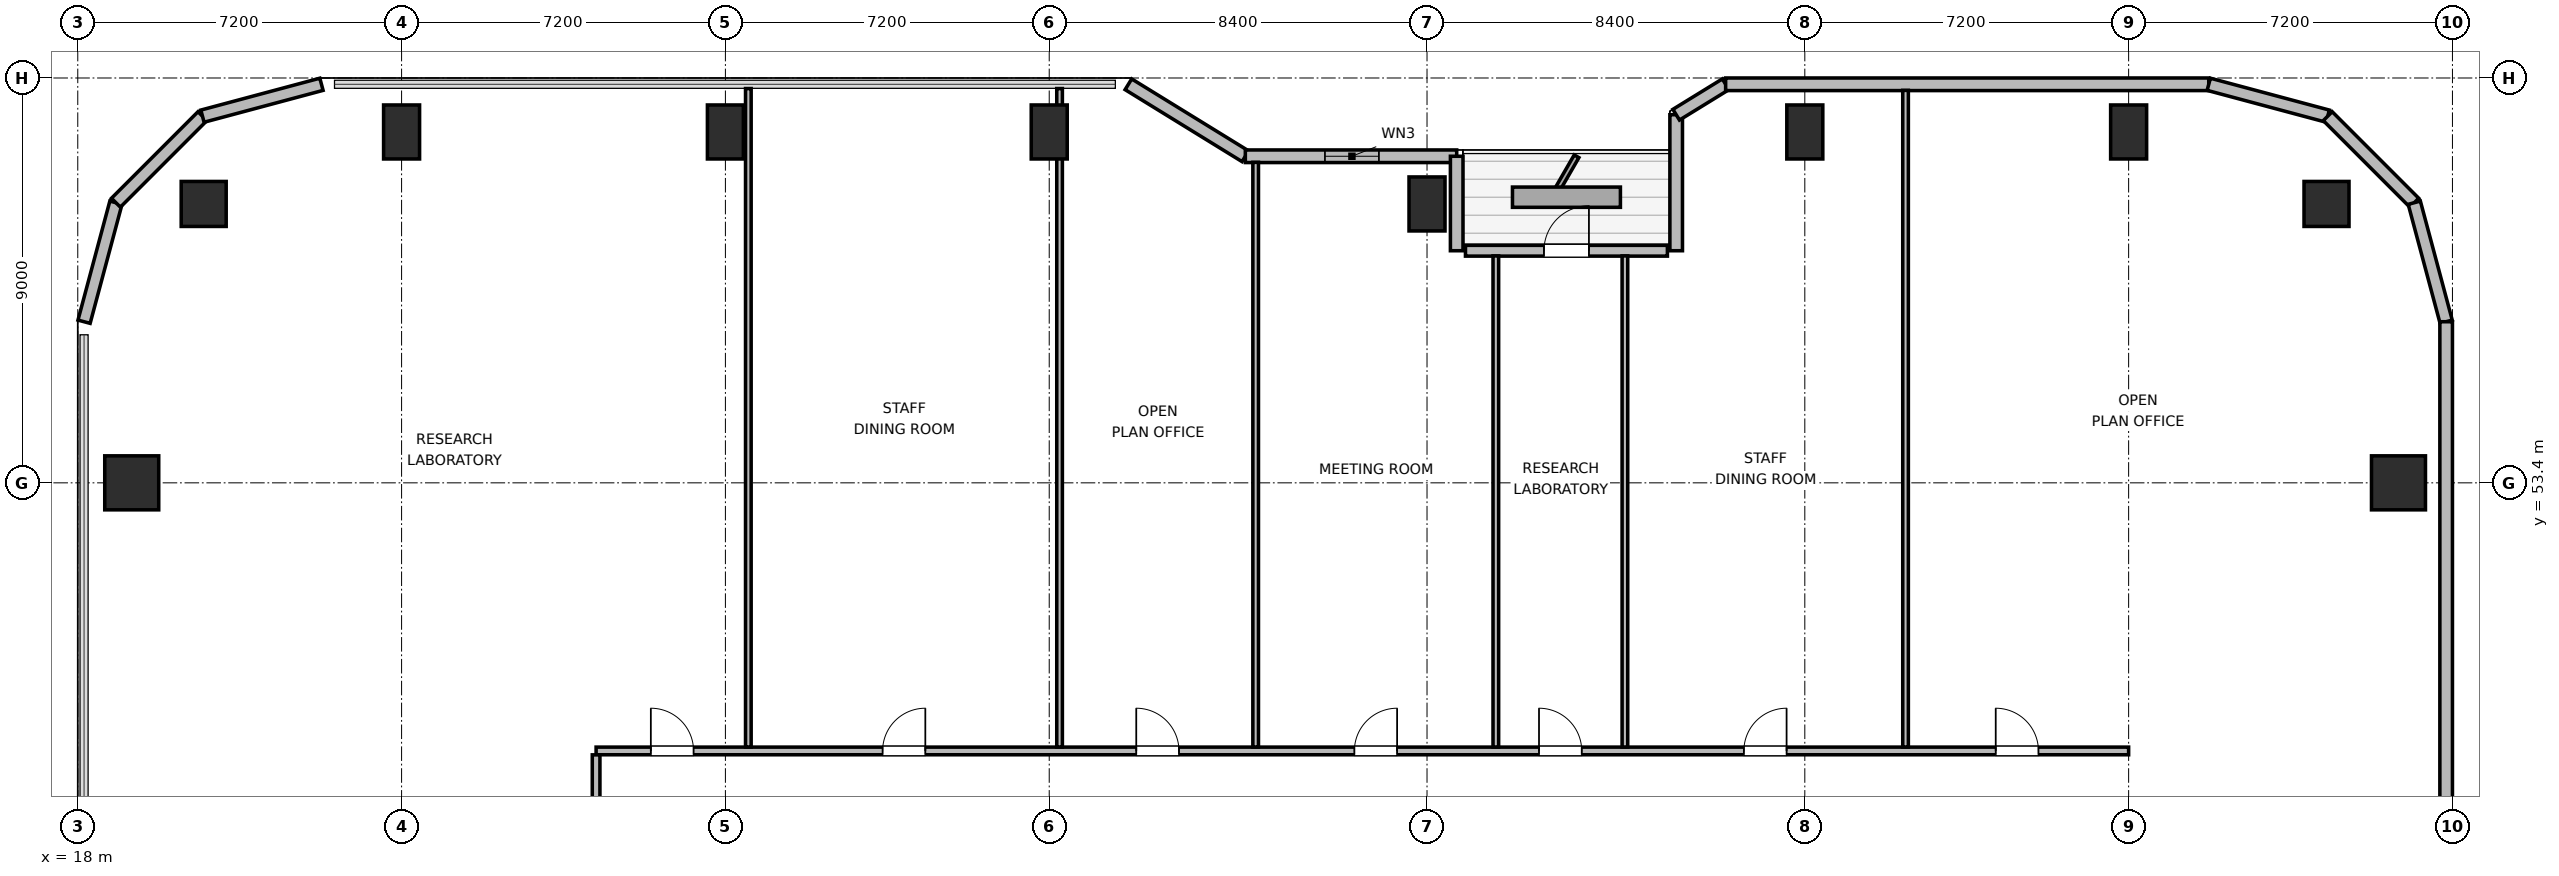
"""IFC4 building model, lengths in metres.
Left out: names, types, materials, properties, quantities, classifications, styles, units other than length and angle.
Written with IfcOpenShell. Run it as: python <this file> out.ifc"""

import sys

from ifc_helpers import new_model, si_unit, direction, frame, frame_2d, origin, origin_2d, place, context, subcontext, project, spatial, rectangle, circle, extrude, element, fill, save


model = new_model("IFC4")
c1 = context("Model", 3, precision=1e-05, world=origin(), true_north=direction((0.0, 1.0)))
c2 = subcontext(c1, "Body", "Model", "MODEL_VIEW")
j1 = project(units=[si_unit("LENGTHUNIT", "METRE"), si_unit("PLANEANGLEUNIT", "RADIAN")], contexts=[c1])
p1 = place(None, origin())
s1 = spatial("IfcSite", under=j1, at=p1, CompositionType="ELEMENT")
p2 = place(p1, origin())
s2 = spatial("IfcBuilding", under=s1, at=p2, CompositionType="ELEMENT")
p3 = place(p2, frame((0.0, 0.0, 174.0)))
s3 = spatial("IfcBuildingStorey", under=s2, at=p3, CompositionType="ELEMENT", Elevation=174.0)
for number, where, z_axis, x_axis in (
    (1, (68.0, 59.6, 0.0), (0.0, 0.0, 1.0), (1.0, 0.0, 0.0)),
    (2, (20.8, 59.6, 0.0), (0.0, 0.0, 1.0), (1.0, 0.0, 0.0)),
):
    element("IfcColumn", number, at=place(p3, frame(where, z_axis=z_axis, x_axis=x_axis)), inside=s3, PredefinedType="COLUMN", context=c2, shape_type="SweptSolid", body=[
        extrude(circle(Radius=0.5, at=origin_2d()), origin(), (0.0, 0.0, 1.0), 3.9),
    ])
for number, where, z_axis, x_axis in (
    (3, (25.2, 61.2, 0.0), (0.0, 0.0, 1.0), (1.0, 0.0, 0.0)),
    (4, (32.4, 61.2, 0.0), (0.0, 0.0, 1.0), (1.0, 0.0, 0.0)),
    (5, (39.6, 61.2, 0.0), (0.0, 0.0, 1.0), (1.0, 0.0, 0.0)),
    (6, (48.0, 59.6, 0.0), (0.0, 0.0, 1.0), (1.0, 0.0, 0.0)),
    (7, (56.4, 61.2, 0.0), (0.0, 0.0, 1.0), (1.0, 0.0, 0.0)),
    (8, (63.6, 61.2, 0.0), (0.0, 0.0, 1.0), (1.0, 0.0, 0.0)),
):
    element("IfcColumn", number, at=place(p3, frame(where, z_axis=z_axis, x_axis=x_axis)), inside=s3, PredefinedType="COLUMN", context=c2, shape_type="SweptSolid", body=[
        extrude(rectangle(XDim=0.8, YDim=1.2, at=origin_2d()), origin(), (0.0, 0.0, 1.0), 3.9),
    ])
for number, where, z_axis, x_axis in (
    (9, (19.2, 53.4, 0.0), (0.0, 0.0, 1.0), (1.0, 0.0, 0.0)),
    (10, (69.6, 53.4, 0.0), (0.0, 0.0, 1.0), (1.0, 0.0, 0.0)),
):
    element("IfcColumn", number, at=place(p3, frame(where, z_axis=z_axis, x_axis=x_axis)), inside=s3, PredefinedType="COLUMN", context=c2, shape_type="SweptSolid", body=[
        extrude(rectangle(XDim=1.2, YDim=1.2, at=origin_2d()), origin(), (0.0, 0.0, 1.0), 3.9),
    ])
p4 = place(p3, frame((18.14, 56.982, 0.0), z_axis=(0.0, 0.0, 1.0), x_axis=(0.258672222976, 0.9659651552, 0.0)))
e11 = element("IfcWall", 11, at=p4, inside=s3, PredefinedType="SOLIDWALL", context=c2, shape_type="SweptSolid", body=[
    extrude(rectangle(XDim=2.739, YDim=0.28, at=frame_2d((1.37, 0.0))), origin(), (0.0, 0.0, 1.0), 3.68),
])
p5 = place(p3, frame((18.848, 59.627, 0.0), z_axis=(0.0, 0.0, 1.0), x_axis=(0.707106781187, 0.707106781187, 0.0)))
e12 = element("IfcWall", 12, at=p5, inside=s3, PredefinedType="SOLIDWALL", context=c2, shape_type="SweptSolid", body=[
    extrude(rectangle(XDim=2.721, YDim=0.28, at=frame_2d((1.36, 0.0))), origin(), (0.0, 0.0, 1.0), 3.68),
])
p6 = place(p3, frame((20.772, 61.552, 0.0), z_axis=(0.0, 0.0, 1.0), x_axis=(0.965971118627, 0.258649952598, 0.0)))
e13 = element("IfcWall", 13, at=p6, inside=s3, PredefinedType="SOLIDWALL", context=c2, shape_type="SweptSolid", body=[
    extrude(rectangle(XDim=2.739, YDim=0.28, at=frame_2d((1.37, 0.0))), origin(), (0.0, 0.0, 1.0), 3.68),
])
p7 = place(p3, frame((41.36, 62.26, 0.0), z_axis=(0.0, 0.0, 1.0), x_axis=(0.851652825334, -0.524106349037, 0.0)))
e14 = element("IfcWall", 14, at=p7, inside=s3, PredefinedType="SOLIDWALL", context=c2, shape_type="SweptSolid", body=[
    extrude(rectangle(XDim=3.053, YDim=0.28, at=frame_2d((1.526, 0.0))), origin(), (0.0, 0.0, 1.0), 2.265),
])
p8 = place(p3, frame((43.96, 60.66, 0.0), z_axis=(0.0, 0.0, 1.0), x_axis=(1.0, 0.0, 0.0)))
e15 = element("IfcWall", 15, at=p8, inside=s3, PredefinedType="SOLIDWALL", context=c2, shape_type="SweptSolid", body=[
    extrude(rectangle(XDim=4.699, YDim=0.28, at=frame_2d((2.35, 0.0))), origin(), (0.0, 0.0, 1.0), 2.265),
])
p9 = place(p8, frame((1.77, 0.0, 0.85)))
e16 = element("IfcOpeningElement", 16, at=p9, cuts=e15, PredefinedType="OPENING", context=c2, shape_type="SweptSolid", body=[
    extrude(rectangle(XDim=1.2, YDim=1.1, at=frame_2d((0.6, 0.55))), frame((0.0, 0.15, 0.0), z_axis=(0.0, -1.0, 0.0), x_axis=(1.0, 0.0, 0.0)), (0.0, 0.0, 1.0), 0.3),
])
p10 = place(p3, frame((48.66, 60.66, 0.0), z_axis=(0.0, 0.0, 1.0), x_axis=(0.0, -1.0, 0.0)))
e17 = element("IfcWall", 17, at=p10, inside=s3, PredefinedType="SOLIDWALL", context=c2, shape_type="SweptSolid", body=[
    extrude(rectangle(XDim=2.1, YDim=0.28, at=frame_2d((1.05, 0.0))), origin(), (0.0, 0.0, 1.0), 2.265),
])
p11 = place(p3, frame((48.855, 58.56, 0.0), z_axis=(0.0, 0.0, 1.0), x_axis=(1.0, 0.0, 0.0)))
e18 = element("IfcWall", 18, at=p11, inside=s3, PredefinedType="SOLIDWALL", context=c2, shape_type="SweptSolid", body=[
    extrude(rectangle(XDim=4.49, YDim=0.24, at=frame_2d((2.245, 0.0))), origin(), (0.0, 0.0, 1.0), 3.68),
])
p12 = place(p11, frame((1.745, 0.0, 0.0)))
e19 = element("IfcOpeningElement", 19, at=p12, cuts=e18, PredefinedType="OPENING", context=c2, shape_type="SweptSolid", body=[
    extrude(rectangle(XDim=1.0, YDim=2.02, at=frame_2d((0.5, 1.01))), frame((0.0, 0.13, 0.0), z_axis=(0.0, -1.0, 0.0), x_axis=(1.0, 0.0, 0.0)), (0.0, 0.0, 1.0), 0.26),
])
p13 = place(p3, frame((53.54, 58.56, 0.0), z_axis=(0.0, 0.0, 1.0), x_axis=(0.0, 1.0, 0.0)))
e20 = element("IfcWall", 20, at=p13, inside=s3, PredefinedType="SOLIDWALL", context=c2, shape_type="SweptSolid", body=[
    extrude(rectangle(XDim=3.024, YDim=0.28, at=frame_2d((1.512, 0.0))), origin(), (0.0, 0.0, 1.0), 2.265),
])
p14 = place(p3, frame((53.54, 61.584, 0.0), z_axis=(0.0, 0.0, 1.0), x_axis=(0.851801140441, 0.523865266212, 0.0)))
e21 = element("IfcWall", 21, at=p14, inside=s3, PredefinedType="SOLIDWALL", context=c2, shape_type="SweptSolid", body=[
    extrude(rectangle(XDim=1.291, YDim=0.28, at=frame_2d((0.646, 0.0))), origin(), (0.0, 0.0, 1.0), 3.68),
])
p15 = place(p3, frame((54.64, 62.26, 0.0), z_axis=(0.0, 0.0, 1.0), x_axis=(1.0, 0.0, 0.0)))
e22 = element("IfcWall", 22, at=p15, inside=s3, PredefinedType="SOLIDWALL", context=c2, shape_type="SweptSolid", body=[
    extrude(rectangle(XDim=10.742, YDim=0.28, at=frame_2d((5.371, 0.0))), origin(), (0.0, 0.0, 1.0), 3.68),
])
p16 = place(p3, frame((65.382, 62.26, 0.0), z_axis=(0.0, 0.0, 1.0), x_axis=(0.965971118627, -0.258649952598, 0.0)))
e23 = element("IfcWall", 23, at=p16, inside=s3, PredefinedType="SOLIDWALL", context=c2, shape_type="SweptSolid", body=[
    extrude(rectangle(XDim=2.739, YDim=0.28, at=frame_2d((1.37, 0.0))), origin(), (0.0, 0.0, 1.0), 3.68),
])
p17 = place(p3, frame((68.028, 61.552, 0.0), z_axis=(0.0, 0.0, 1.0), x_axis=(0.707061915429, -0.707151644098, 0.0)))
e24 = element("IfcWall", 24, at=p17, inside=s3, PredefinedType="SOLIDWALL", context=c2, shape_type="SweptSolid", body=[
    extrude(rectangle(XDim=2.721, YDim=0.28, at=frame_2d((1.36, 0.0))), origin(), (0.0, 0.0, 1.0), 3.68),
])
p18 = place(p3, frame((69.951, 59.627, 0.0), z_axis=(0.0, 0.0, 1.0), x_axis=(0.258672222976, -0.9659651552, 0.0)))
e25 = element("IfcWall", 25, at=p18, inside=s3, PredefinedType="SOLIDWALL", context=c2, shape_type="SweptSolid", body=[
    extrude(rectangle(XDim=2.739, YDim=0.28, at=frame_2d((1.37, 0.0))), origin(), (0.0, 0.0, 1.0), 3.68),
])
p19 = place(p3, frame((70.66, 56.982, 0.0), z_axis=(0.0, 0.0, 1.0), x_axis=(0.0, -1.0, 0.0)))
e26 = element("IfcWall", 26, at=p19, inside=s3, PredefinedType="SOLIDWALL", context=c2, shape_type="SweptSolid", body=[
    extrude(rectangle(XDim=14.242, YDim=0.28, at=frame_2d((7.121, 0.0))), origin(), (0.0, 0.0, 1.0), 3.68),
])
p20 = place(p3, frame((29.525, 47.44, 0.0), z_axis=(0.0, 0.0, 1.0), x_axis=(1.0, 0.0, 0.0)))
e27 = element("IfcWall", 27, at=p20, inside=s3, PredefinedType="PARTITIONING", context=c2, shape_type="SweptSolid", body=[
    extrude(rectangle(XDim=34.075, YDim=0.17, at=frame_2d((17.038, 0.0))), origin(), (0.0, 0.0, 1.0), 3.68),
])
p21 = place(p20, frame((1.217, 0.0, 0.0)))
e28 = element("IfcOpeningElement", 28, at=p21, cuts=e27, PredefinedType="OPENING", context=c2, shape_type="SweptSolid", body=[
    extrude(rectangle(XDim=0.95, YDim=2.04, at=frame_2d((0.475, 1.02))), frame((0.0, 0.095, 0.0), z_axis=(0.0, -1.0, 0.0), x_axis=(1.0, 0.0, 0.0)), (0.0, 0.0, 1.0), 0.19),
])
p22 = place(p20, frame((6.37, 0.0, 0.0)))
e29 = element("IfcOpeningElement", 29, at=p22, cuts=e27, PredefinedType="OPENING", context=c2, shape_type="SweptSolid", body=[
    extrude(rectangle(XDim=0.95, YDim=2.04, at=frame_2d((0.475, 1.02))), frame((0.0, 0.095, 0.0), z_axis=(0.0, -1.0, 0.0), x_axis=(1.0, 0.0, 0.0)), (0.0, 0.0, 1.0), 0.19),
])
p23 = place(p20, frame((12.01, 0.0, 0.0)))
e30 = element("IfcOpeningElement", 30, at=p23, cuts=e27, PredefinedType="OPENING", context=c2, shape_type="SweptSolid", body=[
    extrude(rectangle(XDim=0.95, YDim=2.04, at=frame_2d((0.475, 1.02))), frame((0.0, 0.095, 0.0), z_axis=(0.0, -1.0, 0.0), x_axis=(1.0, 0.0, 0.0)), (0.0, 0.0, 1.0), 0.19),
])
p24 = place(p20, frame((16.86, 0.0, 0.0)))
e31 = element("IfcOpeningElement", 31, at=p24, cuts=e27, PredefinedType="OPENING", context=c2, shape_type="SweptSolid", body=[
    extrude(rectangle(XDim=0.95, YDim=2.04, at=frame_2d((0.475, 1.02))), frame((0.0, 0.095, 0.0), z_axis=(0.0, -1.0, 0.0), x_axis=(1.0, 0.0, 0.0)), (0.0, 0.0, 1.0), 0.19),
])
p25 = place(p20, frame((20.965, 0.0, 0.0)))
e32 = element("IfcOpeningElement", 32, at=p25, cuts=e27, PredefinedType="OPENING", context=c2, shape_type="SweptSolid", body=[
    extrude(rectangle(XDim=0.95, YDim=2.04, at=frame_2d((0.475, 1.02))), frame((0.0, 0.095, 0.0), z_axis=(0.0, -1.0, 0.0), x_axis=(1.0, 0.0, 0.0)), (0.0, 0.0, 1.0), 0.19),
])
p26 = place(p20, frame((25.52, 0.0, 0.0)))
e33 = element("IfcOpeningElement", 33, at=p26, cuts=e27, PredefinedType="OPENING", context=c2, shape_type="SweptSolid", body=[
    extrude(rectangle(XDim=0.95, YDim=2.04, at=frame_2d((0.475, 1.02))), frame((0.0, 0.095, 0.0), z_axis=(0.0, -1.0, 0.0), x_axis=(1.0, 0.0, 0.0)), (0.0, 0.0, 1.0), 0.19),
])
p27 = place(p20, frame((31.12, 0.0, 0.0)))
e34 = element("IfcOpeningElement", 34, at=p27, cuts=e27, PredefinedType="OPENING", context=c2, shape_type="SweptSolid", body=[
    extrude(rectangle(XDim=0.95, YDim=2.04, at=frame_2d((0.475, 1.02))), frame((0.0, 0.095, 0.0), z_axis=(0.0, -1.0, 0.0), x_axis=(1.0, 0.0, 0.0)), (0.0, 0.0, 1.0), 0.19),
])
p28 = place(p3, frame((29.525, 37.1, 0.0), z_axis=(0.0, 0.0, 1.0), x_axis=(0.0, 1.0, 0.0)))
e35 = element("IfcWall", 35, at=p28, inside=s3, PredefinedType="PARTITIONING", context=c2, shape_type="SweptSolid", body=[
    extrude(rectangle(XDim=10.253, YDim=0.17, at=frame_2d((5.126, 0.0))), origin(), (0.0, 0.0, 1.0), 3.68),
])
p29 = place(p28, frame((4.695, 0.0, 0.0)))
e36 = element("IfcOpeningElement", 36, at=p29, cuts=e35, PredefinedType="OPENING", context=c2, shape_type="SweptSolid", body=[
    extrude(rectangle(XDim=0.95, YDim=2.04, at=frame_2d((0.475, 1.02))), frame((0.0, 0.095, 0.0), z_axis=(0.0, -1.0, 0.0), x_axis=(1.0, 0.0, 0.0)), (0.0, 0.0, 1.0), 0.19),
])
p30 = place(p3, frame((32.91, 47.527, 0.0), z_axis=(0.0, 0.0, 1.0), x_axis=(0.0, 1.0, 0.0)))
e37 = element("IfcWall", 37, at=p30, inside=s3, PredefinedType="PARTITIONING", context=c2, shape_type="SweptSolid", body=[
    extrude(rectangle(XDim=14.638, YDim=0.125, at=frame_2d((7.319, 0.0))), origin(), (0.0, 0.0, 1.0), 3.68),
])
p31 = place(p3, frame((39.83, 47.527, 0.0), z_axis=(0.0, 0.0, 1.0), x_axis=(0.0, 1.0, 0.0)))
e38 = element("IfcWall", 38, at=p31, inside=s3, PredefinedType="PARTITIONING", context=c2, shape_type="SweptSolid", body=[
    extrude(rectangle(XDim=14.638, YDim=0.125, at=frame_2d((7.319, 0.0))), origin(), (0.0, 0.0, 1.0), 3.043),
])
p32 = place(p3, frame((44.19, 47.527, 0.0), z_axis=(0.0, 0.0, 1.0), x_axis=(0.0, 1.0, 0.0)))
e39 = element("IfcWall", 39, at=p32, inside=s3, PredefinedType="PARTITIONING", context=c2, shape_type="SweptSolid", body=[
    extrude(rectangle(XDim=12.998, YDim=0.125, at=frame_2d((6.499, 0.0))), origin(), (0.0, 0.0, 1.0), 3.043),
])
p33 = place(p3, frame((49.53, 47.527, 0.0), z_axis=(0.0, 0.0, 1.0), x_axis=(0.0, 1.0, 0.0)))
e40 = element("IfcWall", 40, at=p33, inside=s3, PredefinedType="PARTITIONING", context=c2, shape_type="SweptSolid", body=[
    extrude(rectangle(XDim=10.918, YDim=0.125, at=frame_2d((5.459, 0.0))), origin(), (0.0, 0.0, 1.0), 3.68),
])
p34 = place(p3, frame((52.4, 47.527, 0.0), z_axis=(0.0, 0.0, 1.0), x_axis=(0.0, 1.0, 0.0)))
e41 = element("IfcWall", 41, at=p34, inside=s3, PredefinedType="PARTITIONING", context=c2, shape_type="SweptSolid", body=[
    extrude(rectangle(XDim=10.918, YDim=0.125, at=frame_2d((5.459, 0.0))), origin(), (0.0, 0.0, 1.0), 3.043),
])
p35 = place(p3, frame((58.64, 47.527, 0.0), z_axis=(0.0, 0.0, 1.0), x_axis=(0.0, 1.0, 0.0)))
e42 = element("IfcWall", 42, at=p35, inside=s3, PredefinedType="PARTITIONING", context=c2, shape_type="SweptSolid", body=[
    extrude(rectangle(XDim=14.598, YDim=0.125, at=frame_2d((7.299, 0.0))), origin(), (0.0, 0.0, 1.0), 3.68),
])
p36 = place(p9, origin())
e43 = element("IfcWindow", 43, at=p36, inside=s3, PartitioningType="SINGLE_PANEL", PredefinedType="WINDOW", context=c2, shape_type="SweptSolid", body=[
    extrude(rectangle(XDim=1.2, YDim=1.1, at=frame_2d((0.6, 0.55))), frame((0.0, 0.03, 0.0), z_axis=(0.0, -1.0, 0.0), x_axis=(1.0, 0.0, 0.0)), (0.0, 0.0, 1.0), 0.06),
])
fill(e16, e43)
p37 = place(p12, origin())
e44 = element("IfcDoor", 44, at=p37, inside=s3, OperationType="SINGLE_SWING_RIGHT", PredefinedType="DOOR", context=c2, shape_type="SweptSolid", body=[
    extrude(rectangle(XDim=1.0, YDim=2.02, at=frame_2d((0.5, 1.01))), frame((0.0, 0.025, 0.0), z_axis=(0.0, -1.0, 0.0), x_axis=(1.0, 0.0, 0.0)), (0.0, 0.0, 1.0), 0.05),
])
fill(e19, e44)
p38 = place(p21, origin())
e45 = element("IfcDoor", 45, at=p38, inside=s3, OperationType="SINGLE_SWING_LEFT", PredefinedType="DOOR", context=c2, shape_type="SweptSolid", body=[
    extrude(rectangle(XDim=0.95, YDim=2.04, at=frame_2d((0.475, 1.02))), frame((0.0, 0.025, 0.0), z_axis=(0.0, -1.0, 0.0), x_axis=(1.0, 0.0, 0.0)), (0.0, 0.0, 1.0), 0.05),
])
fill(e28, e45)
p39 = place(p22, origin())
e46 = element("IfcDoor", 46, at=p39, inside=s3, OperationType="SINGLE_SWING_RIGHT", PredefinedType="DOOR", context=c2, shape_type="SweptSolid", body=[
    extrude(rectangle(XDim=0.95, YDim=2.04, at=frame_2d((0.475, 1.02))), frame((0.0, 0.025, 0.0), z_axis=(0.0, -1.0, 0.0), x_axis=(1.0, 0.0, 0.0)), (0.0, 0.0, 1.0), 0.05),
])
fill(e29, e46)
p40 = place(p23, origin())
e47 = element("IfcDoor", 47, at=p40, inside=s3, OperationType="SINGLE_SWING_LEFT", PredefinedType="DOOR", context=c2, shape_type="SweptSolid", body=[
    extrude(rectangle(XDim=0.95, YDim=2.04, at=frame_2d((0.475, 1.02))), frame((0.0, 0.025, 0.0), z_axis=(0.0, -1.0, 0.0), x_axis=(1.0, 0.0, 0.0)), (0.0, 0.0, 1.0), 0.05),
])
fill(e30, e47)
p41 = place(p24, origin())
e48 = element("IfcDoor", 48, at=p41, inside=s3, OperationType="SINGLE_SWING_RIGHT", PredefinedType="DOOR", context=c2, shape_type="SweptSolid", body=[
    extrude(rectangle(XDim=0.95, YDim=2.04, at=frame_2d((0.475, 1.02))), frame((0.0, 0.025, 0.0), z_axis=(0.0, -1.0, 0.0), x_axis=(1.0, 0.0, 0.0)), (0.0, 0.0, 1.0), 0.05),
])
fill(e31, e48)
p42 = place(p25, origin())
e49 = element("IfcDoor", 49, at=p42, inside=s3, OperationType="SINGLE_SWING_LEFT", PredefinedType="DOOR", context=c2, shape_type="SweptSolid", body=[
    extrude(rectangle(XDim=0.95, YDim=2.04, at=frame_2d((0.475, 1.02))), frame((0.0, 0.025, 0.0), z_axis=(0.0, -1.0, 0.0), x_axis=(1.0, 0.0, 0.0)), (0.0, 0.0, 1.0), 0.05),
])
fill(e32, e49)
p43 = place(p26, origin())
e50 = element("IfcDoor", 50, at=p43, inside=s3, OperationType="SINGLE_SWING_RIGHT", PredefinedType="DOOR", context=c2, shape_type="SweptSolid", body=[
    extrude(rectangle(XDim=0.95, YDim=2.04, at=frame_2d((0.475, 1.02))), frame((0.0, 0.025, 0.0), z_axis=(0.0, -1.0, 0.0), x_axis=(1.0, 0.0, 0.0)), (0.0, 0.0, 1.0), 0.05),
])
fill(e33, e50)
p44 = place(p27, origin())
e51 = element("IfcDoor", 51, at=p44, inside=s3, OperationType="SINGLE_SWING_LEFT", PredefinedType="DOOR", context=c2, shape_type="SweptSolid", body=[
    extrude(rectangle(XDim=0.95, YDim=2.04, at=frame_2d((0.475, 1.02))), frame((0.0, 0.025, 0.0), z_axis=(0.0, -1.0, 0.0), x_axis=(1.0, 0.0, 0.0)), (0.0, 0.0, 1.0), 0.05),
])
fill(e34, e51)
save(model, sys.argv[1])
